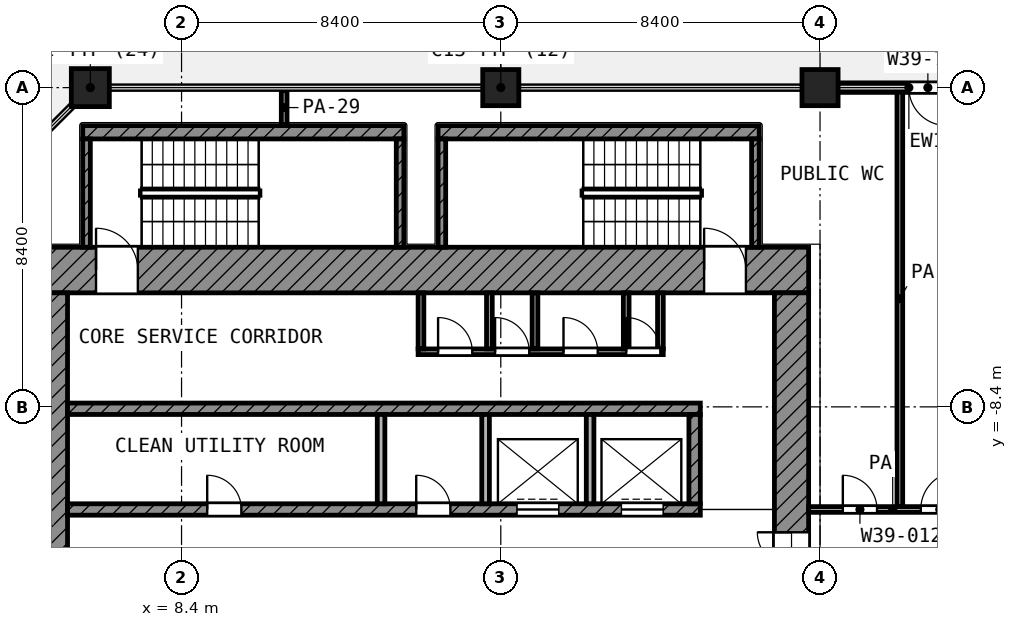
"""IFC4 building model, lengths in metres.
Left out: names, types, materials, properties, quantities, classifications, styles, units other than length and angle.
Written with IfcOpenShell. Run it as: python <this file> out.ifc"""

import sys

from ifc_helpers import new_model, si_unit, direction, frame, frame_2d, origin, origin_2d, place, context, subcontext, project, spatial, rectangle, extrude, element, fill, save


model = new_model("IFC4")
c1 = context("Model", 3, precision=1e-05, world=origin(), true_north=direction((0.0, 1.0)))
c2 = subcontext(c1, "Body", "Model", "MODEL_VIEW")
j1 = project(units=[si_unit("LENGTHUNIT", "METRE"), si_unit("PLANEANGLEUNIT", "RADIAN")], contexts=[c1])
p1 = place(None, origin())
s1 = spatial("IfcSite", under=j1, at=p1, CompositionType="ELEMENT")
p2 = place(p1, origin())
s2 = spatial("IfcBuilding", under=s1, at=p2, CompositionType="ELEMENT")
p3 = place(p2, frame((0.0, 0.0, 171.0)))
s3 = spatial("IfcBuildingStorey", under=s2, at=p3, CompositionType="ELEMENT", Elevation=171.0)
p4 = place(p3, frame((6.0, 0.0, 0.0), z_axis=(0.0, 0.0, 1.0), x_axis=(1.0, 0.0, 0.0)))
e1 = element("IfcColumn", 1, at=p4, inside=s3, PredefinedType="COLUMN", context=c2, shape_type="SweptSolid", body=[
    extrude(rectangle(XDim=1.0, YDim=1.0, at=origin_2d()), origin(), (0.0, 0.0, 1.0), 4.2),
])
for number, where, z_axis, x_axis in (
    (2, (16.8, 0.0, 0.0), (0.0, 0.0, 1.0), (1.0, 0.0, 0.0)),
    (3, (25.2, 0.0, 0.0), (0.0, 0.0, 1.0), (1.0, 0.0, 0.0)),
):
    element("IfcColumn", number, at=place(p3, frame(where, z_axis=z_axis, x_axis=x_axis)), inside=s3, PredefinedType="COLUMN", context=c2, shape_type="SweptSolid", body=[
        extrude(rectangle(XDim=0.95, YDim=0.95, at=origin_2d()), origin(), (0.0, 0.0, 1.0), 4.2),
    ])
p5 = place(p3, frame((29.4, 0.0, 0.0), z_axis=(0.0, 0.0, 1.0), x_axis=(-1.0, 0.0, 0.0)))
e4 = element("IfcWall", 4, at=p5, inside=s3, PredefinedType="SOLIDWALL", context=c2, shape_type="SweptSolid", body=[
    extrude(rectangle(XDim=3.725, YDim=0.25, at=frame_2d((1.862, 0.0))), origin(), (0.0, 0.0, 1.0), 2.58),
])
p6 = place(p5, frame((0.863, 0.0, 0.0)))
e5 = element("IfcOpeningElement", 5, at=p6, cuts=e4, PredefinedType="OPENING", context=c2, shape_type="SweptSolid", body=[
    extrude(rectangle(XDim=1.0, YDim=2.1, at=frame_2d((0.5, 1.05))), frame((0.0, 0.135, 0.0), z_axis=(0.0, -1.0, 0.0), x_axis=(1.0, 0.0, 0.0)), (0.0, 0.0, 1.0), 0.27),
])
p7 = place(p3, frame((4.2, -4.8, 0.0), z_axis=(0.0, 0.0, 1.0), x_axis=(1.0, 0.0, 0.0)))
e6 = element("IfcWall", 6, at=p7, inside=s3, PredefinedType="SHEAR", context=c2, shape_type="SweptSolid", body=[
    extrude(rectangle(XDim=20.7, YDim=1.2, at=frame_2d((10.35, 0.0))), origin(), (0.0, 0.0, 1.0), 3.6),
])
p8 = place(p7, frame((1.95, 0.0, 0.0)))
e7 = element("IfcOpeningElement", 7, at=p8, cuts=e6, PredefinedType="OPENING", context=c2, shape_type="SweptSolid", body=[
    extrude(rectangle(XDim=1.1, YDim=2.1, at=frame_2d((0.55, 1.05))), frame((0.0, 0.61, 0.0), z_axis=(0.0, -1.0, 0.0), x_axis=(1.0, 0.0, 0.0)), (0.0, 0.0, 1.0), 1.22),
])
p9 = place(p7, frame((17.95, 0.0, 0.0)))
e8 = element("IfcOpeningElement", 8, at=p9, cuts=e6, PredefinedType="OPENING", context=c2, shape_type="SweptSolid", body=[
    extrude(rectangle(XDim=1.1, YDim=2.1, at=frame_2d((0.55, 1.05))), frame((0.0, 0.61, 0.0), z_axis=(0.0, -1.0, 0.0), x_axis=(1.0, 0.0, 0.0)), (0.0, 0.0, 1.0), 1.22),
])
p10 = place(p3, frame((4.8, -24.9, 0.0), z_axis=(0.0, 0.0, 1.0), x_axis=(0.0, 1.0, 0.0)))
e9 = element("IfcWall", 9, at=p10, inside=s3, PredefinedType="SHEAR", context=c2, shape_type="SweptSolid", body=[
    extrude(rectangle(XDim=19.5, YDim=1.2, at=frame_2d((9.75, 0.0))), origin(), (0.0, 0.0, 1.0), 3.6),
])
p11 = place(p10, frame((11.35, 0.0, 0.0)))
e10 = element("IfcOpeningElement", 10, at=p11, cuts=e9, PredefinedType="OPENING", context=c2, shape_type="SweptSolid", body=[
    extrude(rectangle(XDim=1.1, YDim=2.1, at=frame_2d((0.55, 1.05))), frame((0.0, 0.61, 0.0), z_axis=(0.0, -1.0, 0.0), x_axis=(1.0, 0.0, 0.0)), (0.0, 0.0, 1.0), 1.22),
])
p12 = place(p10, frame((2.05, 0.0, 0.0)))
e11 = element("IfcOpeningElement", 11, at=p12, cuts=e9, PredefinedType="OPENING", context=c2, shape_type="SweptSolid", body=[
    extrude(rectangle(XDim=1.1, YDim=2.1, at=frame_2d((0.55, 1.05))), frame((0.0, 0.61, 0.0), z_axis=(0.0, -1.0, 0.0), x_axis=(1.0, 0.0, 0.0)), (0.0, 0.0, 1.0), 1.22),
])
p13 = place(p3, frame((24.45, -24.0, 0.0), z_axis=(0.0, 0.0, 1.0), x_axis=(0.0, 1.0, 0.0)))
e12 = element("IfcWall", 12, at=p13, inside=s3, PredefinedType="SHEAR", context=c2, shape_type="SweptSolid", body=[
    extrude(rectangle(XDim=18.6, YDim=0.9, at=frame_2d((9.3, 0.0))), origin(), (0.0, 0.0, 1.0), 3.6),
])
p14 = place(p13, frame((10.5, 0.0, 0.0)))
e13 = element("IfcOpeningElement", 13, at=p14, cuts=e12, PredefinedType="OPENING", context=c2, shape_type="SweptSolid", body=[
    extrude(rectangle(XDim=1.8, YDim=2.1, at=frame_2d((0.9, 1.05))), frame((0.0, 0.46, 0.0), z_axis=(0.0, -1.0, 0.0), x_axis=(1.0, 0.0, 0.0)), (0.0, 0.0, 1.0), 0.92),
])
p15 = place(p3, frame((5.4, -8.45, 0.0), z_axis=(0.0, 0.0, 1.0), x_axis=(1.0, 0.0, 0.0)))
e14 = element("IfcWall", 14, at=p15, inside=s3, PredefinedType="SHEAR", context=c2, shape_type="SweptSolid", body=[
    extrude(rectangle(XDim=16.65, YDim=0.3, at=frame_2d((8.325, 0.0))), origin(), (0.0, 0.0, 1.0), 3.6),
])
p16 = place(p3, frame((5.4, -11.1, 0.0), z_axis=(0.0, 0.0, 1.0), x_axis=(1.0, 0.0, 0.0)))
e15 = element("IfcWall", 15, at=p16, inside=s3, PredefinedType="SHEAR", context=c2, shape_type="SweptSolid", body=[
    extrude(rectangle(XDim=16.65, YDim=0.3, at=frame_2d((8.325, 0.0))), origin(), (0.0, 0.0, 1.0), 3.6),
])
p17 = place(p16, frame((11.825, 0.0, 0.0)))
e16 = element("IfcOpeningElement", 16, at=p17, cuts=e15, PredefinedType="OPENING", context=c2, shape_type="SweptSolid", body=[
    extrude(rectangle(XDim=1.1, YDim=2.1, at=frame_2d((0.55, 1.05))), frame((0.0, 0.16, 0.0), z_axis=(0.0, -1.0, 0.0), x_axis=(1.0, 0.0, 0.0)), (0.0, 0.0, 1.0), 0.32),
])
p18 = place(p16, frame((14.575, 0.0, 0.0)))
e17 = element("IfcOpeningElement", 17, at=p18, cuts=e15, PredefinedType="OPENING", context=c2, shape_type="SweptSolid", body=[
    extrude(rectangle(XDim=1.1, YDim=2.1, at=frame_2d((0.55, 1.05))), frame((0.0, 0.16, 0.0), z_axis=(0.0, -1.0, 0.0), x_axis=(1.0, 0.0, 0.0)), (0.0, 0.0, 1.0), 0.32),
])
p19 = place(p16, frame((3.675, 0.0, 0.0)))
e18 = element("IfcOpeningElement", 18, at=p19, cuts=e15, PredefinedType="OPENING", context=c2, shape_type="SweptSolid", body=[
    extrude(rectangle(XDim=0.9, YDim=2.1, at=frame_2d((0.45, 1.05))), frame((0.0, 0.16, 0.0), z_axis=(0.0, -1.0, 0.0), x_axis=(1.0, 0.0, 0.0)), (0.0, 0.0, 1.0), 0.32),
])
p20 = place(p16, frame((9.175, 0.0, 0.0)))
e19 = element("IfcOpeningElement", 19, at=p20, cuts=e15, PredefinedType="OPENING", context=c2, shape_type="SweptSolid", body=[
    extrude(rectangle(XDim=0.9, YDim=2.1, at=frame_2d((0.45, 1.05))), frame((0.0, 0.16, 0.0), z_axis=(0.0, -1.0, 0.0), x_axis=(1.0, 0.0, 0.0)), (0.0, 0.0, 1.0), 0.32),
])
p21 = place(p3, frame((21.9, -10.95, 0.0), z_axis=(0.0, 0.0, 1.0), x_axis=(0.0, 1.0, 0.0)))
e20 = element("IfcWall", 20, at=p21, inside=s3, PredefinedType="SHEAR", context=c2, shape_type="SweptSolid", body=[
    extrude(rectangle(XDim=2.35, YDim=0.3, at=frame_2d((1.175, 0.0))), origin(), (0.0, 0.0, 1.0), 3.6),
])
for number, where, z_axis, x_axis in (
    (21, (13.65, -10.95, 0.0), (0.0, 0.0, 1.0), (0.0, 1.0, 0.0)),
    (22, (16.4, -10.95, 0.0), (0.0, 0.0, 1.0), (0.0, 1.0, 0.0)),
    (23, (19.15, -10.95, 0.0), (0.0, 0.0, 1.0), (0.0, 1.0, 0.0)),
):
    element("IfcWall", number, at=place(p3, frame(where, z_axis=z_axis, x_axis=x_axis)), inside=s3, PredefinedType="PARTITIONING", context=c2, shape_type="SweptSolid", body=[
        extrude(rectangle(XDim=2.35, YDim=0.2, at=frame_2d((1.175, 0.0))), origin(), (0.0, 0.0, 1.0), 3.6),
    ])
p22 = place(p3, frame((14.625, -6.95, 0.0), z_axis=(0.0, 0.0, 1.0), x_axis=(1.0, 0.0, 0.0)))
e24 = element("IfcWall", 24, at=p22, inside=s3, PredefinedType="PARTITIONING", context=c2, shape_type="SweptSolid", body=[
    extrude(rectangle(XDim=6.45, YDim=0.15, at=frame_2d((3.225, 0.0))), origin(), (0.0, 0.0, 1.0), 3.6),
])
p23 = place(p22, frame((0.525, 0.0, 0.0)))
e25 = element("IfcOpeningElement", 25, at=p23, cuts=e24, PredefinedType="OPENING", context=c2, shape_type="SweptSolid", body=[
    extrude(rectangle(XDim=0.9, YDim=2.1, at=frame_2d((0.45, 1.05))), frame((0.0, 0.085, 0.0), z_axis=(0.0, -1.0, 0.0), x_axis=(1.0, 0.0, 0.0)), (0.0, 0.0, 1.0), 0.17),
])
p24 = place(p22, frame((2.025, 0.0, 0.0)))
e26 = element("IfcOpeningElement", 26, at=p24, cuts=e24, PredefinedType="OPENING", context=c2, shape_type="SweptSolid", body=[
    extrude(rectangle(XDim=0.9, YDim=2.1, at=frame_2d((0.45, 1.05))), frame((0.0, 0.085, 0.0), z_axis=(0.0, -1.0, 0.0), x_axis=(1.0, 0.0, 0.0)), (0.0, 0.0, 1.0), 0.17),
])
p25 = place(p22, frame((3.825, 0.0, 0.0)))
e27 = element("IfcOpeningElement", 27, at=p25, cuts=e24, PredefinedType="OPENING", context=c2, shape_type="SweptSolid", body=[
    extrude(rectangle(XDim=0.9, YDim=2.1, at=frame_2d((0.45, 1.05))), frame((0.0, 0.085, 0.0), z_axis=(0.0, -1.0, 0.0), x_axis=(1.0, 0.0, 0.0)), (0.0, 0.0, 1.0), 0.17),
])
p26 = place(p22, frame((5.475, 0.0, 0.0)))
e28 = element("IfcOpeningElement", 28, at=p26, cuts=e24, PredefinedType="OPENING", context=c2, shape_type="SweptSolid", body=[
    extrude(rectangle(XDim=0.9, YDim=2.1, at=frame_2d((0.45, 1.05))), frame((0.0, 0.085, 0.0), z_axis=(0.0, -1.0, 0.0), x_axis=(1.0, 0.0, 0.0)), (0.0, 0.0, 1.0), 0.17),
])
for number, where, z_axis, x_axis in (
    (29, (14.7, -6.875, 0.0), (0.0, 0.0, 1.0), (0.0, 1.0, 0.0)),
    (30, (16.5, -6.875, 0.0), (0.0, 0.0, 1.0), (0.0, 1.0, 0.0)),
    (31, (17.7, -6.875, 0.0), (0.0, 0.0, 1.0), (0.0, 1.0, 0.0)),
    (32, (20.1, -6.875, 0.0), (0.0, 0.0, 1.0), (0.0, 1.0, 0.0)),
    (33, (21.0, -6.875, 0.0), (0.0, 0.0, 1.0), (0.0, 1.0, 0.0)),
):
    element("IfcWall", number, at=place(p3, frame(where, z_axis=z_axis, x_axis=x_axis)), inside=s3, PredefinedType="PARTITIONING", context=c2, shape_type="SweptSolid", body=[
        extrude(rectangle(XDim=1.475, YDim=0.15, at=frame_2d((0.738, 0.0))), origin(), (0.0, 0.0, 1.0), 3.6),
    ])
p27 = place(p3, frame((5.8, -1.175, 0.0), z_axis=(0.0, 0.0, 1.0), x_axis=(1.0, 0.0, 0.0)))
e34 = element("IfcWall", 34, at=p27, inside=s3, PredefinedType="SHEAR", context=c2, shape_type="SweptSolid", body=[
    extrude(rectangle(XDim=8.45, YDim=0.35, at=frame_2d((4.225, 0.0))), origin(), (0.0, 0.0, 1.0), 3.6),
])
for number, where, z_axis, x_axis in (
    (35, (5.9, -4.2, 0.0), (0.0, 0.0, 1.0), (0.0, 1.0, 0.0)),
    (36, (14.15, -4.2, 0.0), (0.0, 0.0, 1.0), (0.0, 1.0, 0.0)),
):
    element("IfcWall", number, at=place(p3, frame(where, z_axis=z_axis, x_axis=x_axis)), inside=s3, PredefinedType="SHEAR", context=c2, shape_type="SweptSolid", body=[
        extrude(rectangle(XDim=2.85, YDim=0.2, at=frame_2d((1.425, 0.0))), origin(), (0.0, 0.0, 1.0), 3.6),
    ])
p28 = place(p3, frame((15.15, -1.175, 0.0), z_axis=(0.0, 0.0, 1.0), x_axis=(1.0, 0.0, 0.0)))
e37 = element("IfcWall", 37, at=p28, inside=s3, PredefinedType="SHEAR", context=c2, shape_type="SweptSolid", body=[
    extrude(rectangle(XDim=8.45, YDim=0.35, at=frame_2d((4.225, 0.0))), origin(), (0.0, 0.0, 1.0), 3.6),
])
for number, where, z_axis, x_axis in (
    (38, (15.25, -4.2, 0.0), (0.0, 0.0, 1.0), (0.0, 1.0, 0.0)),
    (39, (23.5, -4.2, 0.0), (0.0, 0.0, 1.0), (0.0, 1.0, 0.0)),
):
    element("IfcWall", number, at=place(p3, frame(where, z_axis=z_axis, x_axis=x_axis)), inside=s3, PredefinedType="SHEAR", context=c2, shape_type="SweptSolid", body=[
        extrude(rectangle(XDim=2.85, YDim=0.2, at=frame_2d((1.425, 0.0))), origin(), (0.0, 0.0, 1.0), 3.6),
    ])
p29 = place(p3, frame((24.9, -11.1, 0.0), z_axis=(0.0, 0.0, 1.0), x_axis=(1.0, 0.0, 0.0)))
e40 = element("IfcWall", 40, at=p29, inside=s3, PredefinedType="PARTITIONING", context=c2, shape_type="SweptSolid", body=[
    extrude(rectangle(XDim=4.425, YDim=0.15, at=frame_2d((2.212, 0.0))), origin(), (0.0, 0.0, 1.0), 3.6),
])
p30 = place(p29, frame((0.9, 0.0, 0.0)))
e41 = element("IfcOpeningElement", 41, at=p30, cuts=e40, PredefinedType="OPENING", context=c2, shape_type="SweptSolid", body=[
    extrude(rectangle(XDim=0.9, YDim=2.1, at=frame_2d((0.45, 1.05))), frame((0.0, 0.085, 0.0), z_axis=(0.0, -1.0, 0.0), x_axis=(1.0, 0.0, 0.0)), (0.0, 0.0, 1.0), 0.17),
])
p31 = place(p29, frame((2.95, 0.0, 0.0)))
e42 = element("IfcOpeningElement", 42, at=p31, cuts=e40, PredefinedType="OPENING", context=c2, shape_type="SweptSolid", body=[
    extrude(rectangle(XDim=1.0, YDim=2.1, at=frame_2d((0.5, 1.05))), frame((0.0, 0.085, 0.0), z_axis=(0.0, -1.0, 0.0), x_axis=(1.0, 0.0, 0.0)), (0.0, 0.0, 1.0), 0.17),
])
p32 = place(p3, frame((11.1, -0.97, 0.0), z_axis=(0.0, 0.0, 1.0), x_axis=(0.0, 1.0, 0.0)))
e43 = element("IfcWall", 43, at=p32, inside=s3, PredefinedType="PARTITIONING", context=c2, shape_type="SweptSolid", body=[
    extrude(rectangle(XDim=0.89, YDim=0.15, at=frame_2d((0.445, 0.0))), origin(), (0.0, 0.0, 1.0), 2.7),
])
p33 = place(p3, frame((27.3, -11.025, 0.0), z_axis=(0.0, 0.0, 1.0), x_axis=(0.0, 1.0, 0.0)))
e44 = element("IfcWall", 44, at=p33, inside=s3, PredefinedType="PARTITIONING", context=c2, shape_type="SweptSolid", body=[
    extrude(rectangle(XDim=10.945, YDim=0.15, at=frame_2d((5.472, 0.0))), origin(), (0.0, 0.0, 1.0), 2.7),
])
p34 = place(p6, origin())
e45 = element("IfcDoor", 45, at=p34, inside=s3, OperationType="SINGLE_SWING_LEFT", PredefinedType="DOOR", context=c2, shape_type="SweptSolid", body=[
    extrude(rectangle(XDim=1.0, YDim=2.1, at=frame_2d((0.5, 1.05))), frame((0.0, 0.025, 0.0), z_axis=(0.0, -1.0, 0.0), x_axis=(1.0, 0.0, 0.0)), (0.0, 0.0, 1.0), 0.05),
])
fill(e5, e45)
p35 = place(p17, origin())
e46 = element("IfcDoor", 46, at=p35, inside=s3, OperationType="DOUBLE_DOOR_SLIDING", PredefinedType="DOOR", context=c2, shape_type="SweptSolid", body=[
    extrude(rectangle(XDim=1.1, YDim=2.1, at=frame_2d((0.55, 1.05))), frame((0.0, 0.025, 0.0), z_axis=(0.0, -1.0, 0.0), x_axis=(1.0, 0.0, 0.0)), (0.0, 0.0, 1.0), 0.05),
])
fill(e16, e46)
p36 = place(p18, origin())
e47 = element("IfcDoor", 47, at=p36, inside=s3, OperationType="DOUBLE_DOOR_SLIDING", PredefinedType="DOOR", context=c2, shape_type="SweptSolid", body=[
    extrude(rectangle(XDim=1.1, YDim=2.1, at=frame_2d((0.55, 1.05))), frame((0.0, 0.025, 0.0), z_axis=(0.0, -1.0, 0.0), x_axis=(1.0, 0.0, 0.0)), (0.0, 0.0, 1.0), 0.05),
])
fill(e17, e47)
p37 = place(p8, origin())
e48 = element("IfcDoor", 48, at=p37, inside=s3, OperationType="SINGLE_SWING_LEFT", PredefinedType="DOOR", context=c2, shape_type="SweptSolid", body=[
    extrude(rectangle(XDim=1.1, YDim=2.1, at=frame_2d((0.55, 1.05))), frame((0.0, 0.025, 0.0), z_axis=(0.0, -1.0, 0.0), x_axis=(1.0, 0.0, 0.0)), (0.0, 0.0, 1.0), 0.05),
])
fill(e7, e48)
p38 = place(p9, origin())
e49 = element("IfcDoor", 49, at=p38, inside=s3, OperationType="SINGLE_SWING_LEFT", PredefinedType="DOOR", context=c2, shape_type="SweptSolid", body=[
    extrude(rectangle(XDim=1.1, YDim=2.1, at=frame_2d((0.55, 1.05))), frame((0.0, 0.025, 0.0), z_axis=(0.0, -1.0, 0.0), x_axis=(1.0, 0.0, 0.0)), (0.0, 0.0, 1.0), 0.05),
])
fill(e8, e49)
p39 = place(p14, origin())
e50 = element("IfcDoor", 50, at=p39, inside=s3, OperationType="DOUBLE_DOOR_SINGLE_SWING", PredefinedType="DOOR", context=c2, shape_type="SweptSolid", body=[
    extrude(rectangle(XDim=1.8, YDim=2.1, at=frame_2d((0.9, 1.05))), frame((0.0, 0.025, 0.0), z_axis=(0.0, -1.0, 0.0), x_axis=(1.0, 0.0, 0.0)), (0.0, 0.0, 1.0), 0.05),
])
fill(e13, e50)
p40 = place(p23, origin())
e51 = element("IfcDoor", 51, at=p40, inside=s3, OperationType="SINGLE_SWING_LEFT", PredefinedType="DOOR", context=c2, shape_type="SweptSolid", body=[
    extrude(rectangle(XDim=0.9, YDim=2.1, at=frame_2d((0.45, 1.05))), frame((0.0, 0.025, 0.0), z_axis=(0.0, -1.0, 0.0), x_axis=(1.0, 0.0, 0.0)), (0.0, 0.0, 1.0), 0.05),
])
fill(e25, e51)
p41 = place(p24, origin())
e52 = element("IfcDoor", 52, at=p41, inside=s3, OperationType="SINGLE_SWING_LEFT", PredefinedType="DOOR", context=c2, shape_type="SweptSolid", body=[
    extrude(rectangle(XDim=0.9, YDim=2.1, at=frame_2d((0.45, 1.05))), frame((0.0, 0.025, 0.0), z_axis=(0.0, -1.0, 0.0), x_axis=(1.0, 0.0, 0.0)), (0.0, 0.0, 1.0), 0.05),
])
fill(e26, e52)
p42 = place(p25, origin())
e53 = element("IfcDoor", 53, at=p42, inside=s3, OperationType="SINGLE_SWING_LEFT", PredefinedType="DOOR", context=c2, shape_type="SweptSolid", body=[
    extrude(rectangle(XDim=0.9, YDim=2.1, at=frame_2d((0.45, 1.05))), frame((0.0, 0.025, 0.0), z_axis=(0.0, -1.0, 0.0), x_axis=(1.0, 0.0, 0.0)), (0.0, 0.0, 1.0), 0.05),
])
fill(e27, e53)
p43 = place(p26, origin())
e54 = element("IfcDoor", 54, at=p43, inside=s3, OperationType="SINGLE_SWING_LEFT", PredefinedType="DOOR", context=c2, shape_type="SweptSolid", body=[
    extrude(rectangle(XDim=0.9, YDim=2.1, at=frame_2d((0.45, 1.05))), frame((0.0, 0.025, 0.0), z_axis=(0.0, -1.0, 0.0), x_axis=(1.0, 0.0, 0.0)), (0.0, 0.0, 1.0), 0.05),
])
fill(e28, e54)
p44 = place(p19, origin())
e55 = element("IfcDoor", 55, at=p44, inside=s3, OperationType="SINGLE_SWING_LEFT", PredefinedType="DOOR", context=c2, shape_type="SweptSolid", body=[
    extrude(rectangle(XDim=0.9, YDim=2.1, at=frame_2d((0.45, 1.05))), frame((0.0, 0.025, 0.0), z_axis=(0.0, -1.0, 0.0), x_axis=(1.0, 0.0, 0.0)), (0.0, 0.0, 1.0), 0.05),
])
fill(e18, e55)
p45 = place(p20, origin())
e56 = element("IfcDoor", 56, at=p45, inside=s3, OperationType="SINGLE_SWING_LEFT", PredefinedType="DOOR", context=c2, shape_type="SweptSolid", body=[
    extrude(rectangle(XDim=0.9, YDim=2.1, at=frame_2d((0.45, 1.05))), frame((0.0, 0.025, 0.0), z_axis=(0.0, -1.0, 0.0), x_axis=(1.0, 0.0, 0.0)), (0.0, 0.0, 1.0), 0.05),
])
fill(e19, e56)
p46 = place(p30, origin())
e57 = element("IfcDoor", 57, at=p46, inside=s3, OperationType="SINGLE_SWING_LEFT", PredefinedType="DOOR", context=c2, shape_type="SweptSolid", body=[
    extrude(rectangle(XDim=0.9, YDim=2.1, at=frame_2d((0.45, 1.05))), frame((0.0, 0.025, 0.0), z_axis=(0.0, -1.0, 0.0), x_axis=(1.0, 0.0, 0.0)), (0.0, 0.0, 1.0), 0.05),
])
fill(e41, e57)
p47 = place(p31, origin())
e58 = element("IfcDoor", 58, at=p47, inside=s3, OperationType="SINGLE_SWING_RIGHT", PredefinedType="DOOR", context=c2, shape_type="SweptSolid", body=[
    extrude(rectangle(XDim=1.0, YDim=2.1, at=frame_2d((0.5, 1.05))), frame((0.0, 0.025, 0.0), z_axis=(0.0, -1.0, 0.0), x_axis=(1.0, 0.0, 0.0)), (0.0, 0.0, 1.0), 0.05),
])
fill(e42, e58)
save(model, sys.argv[1])
